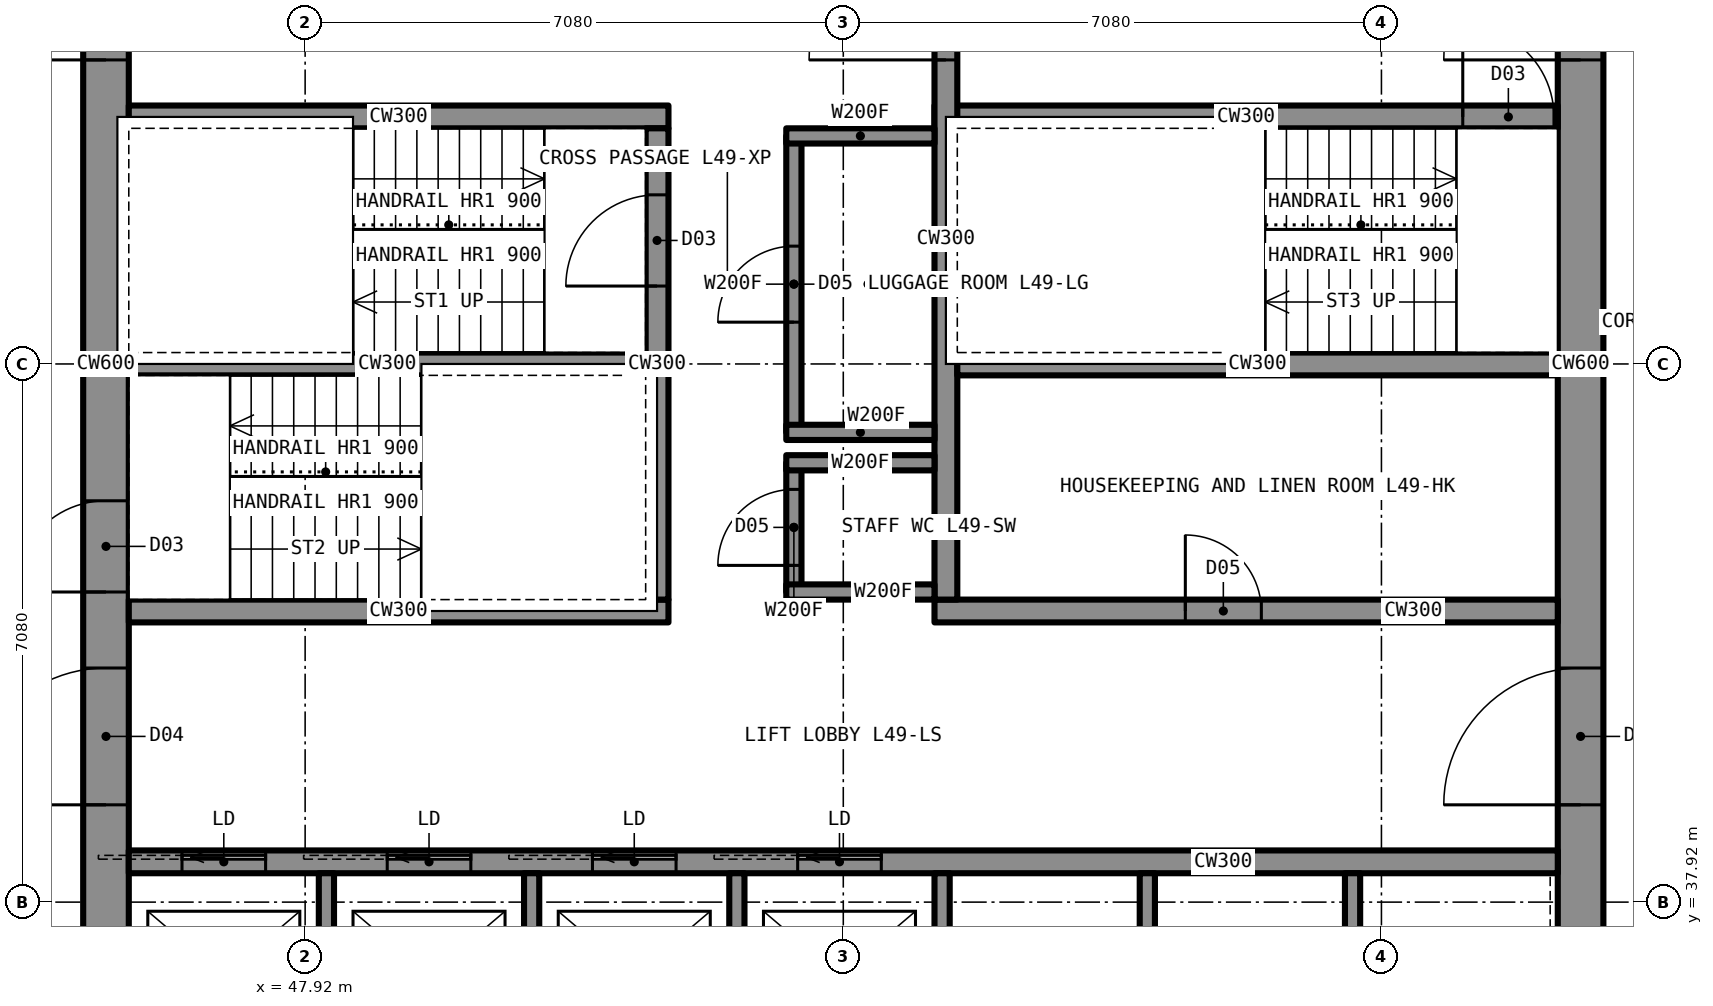
"""IFC4 building model, lengths in metres.
Left out: names, types, materials, properties, quantities, classifications, styles, units other than length and angle.
Written with IfcOpenShell. Run it as: python <this file> out.ifc"""

import sys

from ifc_helpers import new_model, si_unit, direction, frame, frame_2d, origin, place, context, subcontext, project, spatial, rectangle, extrude, element, fill, save


model = new_model("IFC4")
c1 = context("Model", 3, precision=1e-05, world=origin(), true_north=direction((0.0, 1.0)))
c2 = subcontext(c1, "Body", "Model", "MODEL_VIEW")
j1 = project(units=[si_unit("LENGTHUNIT", "METRE"), si_unit("PLANEANGLEUNIT", "RADIAN")], contexts=[c1])
p1 = place(None, origin())
s1 = spatial("IfcSite", under=j1, at=p1, CompositionType="ELEMENT")
p2 = place(p1, origin())
s2 = spatial("IfcBuilding", under=s1, at=p2, CompositionType="ELEMENT")
p3 = place(p2, frame((0.0, 0.0, 182.8)))
s3 = spatial("IfcBuildingStorey", under=s2, at=p3, CompositionType="ELEMENT", Elevation=182.8)
p4 = place(p3, frame((64.7, 35.6, 0.0), z_axis=(0.0, 0.0, 1.0), x_axis=(0.0, 1.0, 0.0)))
e1 = element("IfcWall", 1, at=p4, inside=s3, PredefinedType="SHEAR", context=c2, shape_type="SweptSolid", body=[
    extrude(rectangle(XDim=18.8, YDim=0.6, at=frame_2d((9.4, 0.0))), origin(), (0.0, 0.0, 1.0), 3.5),
])
p5 = place(p4, frame((13.4, 0.0, 0.0)))
e2 = element("IfcOpeningElement", 2, at=p5, cuts=e1, PredefinedType="OPENING", context=c2, shape_type="SweptSolid", body=[
    extrude(rectangle(XDim=1.8, YDim=2.2, at=frame_2d((0.9, 1.1))), frame((0.0, 0.31, 0.0), z_axis=(0.0, -1.0, 0.0), x_axis=(1.0, 0.0, 0.0)), (0.0, 0.0, 1.0), 0.62),
])
p6 = place(p4, frame((3.6, 0.0, 0.0)))
e3 = element("IfcOpeningElement", 3, at=p6, cuts=e1, PredefinedType="OPENING", context=c2, shape_type="SweptSolid", body=[
    extrude(rectangle(XDim=1.8, YDim=2.2, at=frame_2d((0.9, 1.1))), frame((0.0, 0.31, 0.0), z_axis=(0.0, -1.0, 0.0), x_axis=(1.0, 0.0, 0.0)), (0.0, 0.0, 1.0), 0.62),
])
p7 = place(p3, frame((45.3, 35.6, 0.0), z_axis=(0.0, 0.0, 1.0), x_axis=(0.0, 1.0, 0.0)))
e4 = element("IfcWall", 4, at=p7, inside=s3, PredefinedType="SHEAR", context=c2, shape_type="SweptSolid", body=[
    extrude(rectangle(XDim=18.8, YDim=0.6, at=frame_2d((9.4, 0.0))), origin(), (0.0, 0.0, 1.0), 3.5),
])
p8 = place(p7, frame((13.4, 0.0, 0.0)))
e5 = element("IfcOpeningElement", 5, at=p8, cuts=e4, PredefinedType="OPENING", context=c2, shape_type="SweptSolid", body=[
    extrude(rectangle(XDim=1.8, YDim=2.2, at=frame_2d((0.9, 1.1))), frame((0.0, 0.31, 0.0), z_axis=(0.0, -1.0, 0.0), x_axis=(1.0, 0.0, 0.0)), (0.0, 0.0, 1.0), 0.62),
])
p9 = place(p7, frame((3.6, 0.0, 0.0)))
e6 = element("IfcOpeningElement", 6, at=p9, cuts=e4, PredefinedType="OPENING", context=c2, shape_type="SweptSolid", body=[
    extrude(rectangle(XDim=1.8, YDim=2.2, at=frame_2d((0.9, 1.1))), frame((0.0, 0.31, 0.0), z_axis=(0.0, -1.0, 0.0), x_axis=(1.0, 0.0, 0.0)), (0.0, 0.0, 1.0), 0.62),
])
p10 = place(p7, frame((6.4, 0.0, 0.0)))
e7 = element("IfcOpeningElement", 7, at=p10, cuts=e4, PredefinedType="OPENING", context=c2, shape_type="SweptSolid", body=[
    extrude(rectangle(XDim=1.2, YDim=2.2, at=frame_2d((0.6, 1.1))), frame((0.0, 0.31, 0.0), z_axis=(0.0, -1.0, 0.0), x_axis=(1.0, 0.0, 0.0)), (0.0, 0.0, 1.0), 0.62),
])
p11 = place(p3, frame((45.6, 38.45, 0.0), z_axis=(0.0, 0.0, 1.0), x_axis=(1.0, 0.0, 0.0)))
e8 = element("IfcWall", 8, at=p11, inside=s3, PredefinedType="SHEAR", context=c2, shape_type="SweptSolid", body=[
    extrude(rectangle(XDim=18.8, YDim=0.3, at=frame_2d((9.4, 0.0))), origin(), (0.0, 0.0, 1.0), 3.5),
])
p12 = place(p11, frame((0.7, 0.0, 0.0)))
e9 = element("IfcOpeningElement", 9, at=p12, cuts=e8, PredefinedType="OPENING", context=c2, shape_type="SweptSolid", body=[
    extrude(rectangle(XDim=1.1, YDim=2.2, at=frame_2d((0.55, 1.1))), frame((0.0, 0.16, 0.0), z_axis=(0.0, -1.0, 0.0), x_axis=(1.0, 0.0, 0.0)), (0.0, 0.0, 1.0), 0.32),
])
p13 = place(p11, frame((3.4, 0.0, 0.0)))
e10 = element("IfcOpeningElement", 10, at=p13, cuts=e8, PredefinedType="OPENING", context=c2, shape_type="SweptSolid", body=[
    extrude(rectangle(XDim=1.1, YDim=2.2, at=frame_2d((0.55, 1.1))), frame((0.0, 0.16, 0.0), z_axis=(0.0, -1.0, 0.0), x_axis=(1.0, 0.0, 0.0)), (0.0, 0.0, 1.0), 0.32),
])
p14 = place(p11, frame((6.1, 0.0, 0.0)))
e11 = element("IfcOpeningElement", 11, at=p14, cuts=e8, PredefinedType="OPENING", context=c2, shape_type="SweptSolid", body=[
    extrude(rectangle(XDim=1.1, YDim=2.2, at=frame_2d((0.55, 1.1))), frame((0.0, 0.16, 0.0), z_axis=(0.0, -1.0, 0.0), x_axis=(1.0, 0.0, 0.0)), (0.0, 0.0, 1.0), 0.32),
])
p15 = place(p11, frame((8.8, 0.0, 0.0)))
e12 = element("IfcOpeningElement", 12, at=p15, cuts=e8, PredefinedType="OPENING", context=c2, shape_type="SweptSolid", body=[
    extrude(rectangle(XDim=1.1, YDim=2.2, at=frame_2d((0.55, 1.1))), frame((0.0, 0.16, 0.0), z_axis=(0.0, -1.0, 0.0), x_axis=(1.0, 0.0, 0.0)), (0.0, 0.0, 1.0), 0.32),
])
p16 = place(p3, frame((45.6, 48.25, 0.0), z_axis=(0.0, 0.0, 1.0), x_axis=(1.0, 0.0, 0.0)))
e13 = element("IfcWall", 13, at=p16, inside=s3, PredefinedType="SHEAR", context=c2, shape_type="SweptSolid", body=[
    extrude(rectangle(XDim=7.1, YDim=0.3, at=frame_2d((3.55, 0.0))), origin(), (0.0, 0.0, 1.0), 3.5),
])
p17 = place(p3, frame((56.2, 48.25, 0.0), z_axis=(0.0, 0.0, 1.0), x_axis=(1.0, 0.0, 0.0)))
e14 = element("IfcWall", 14, at=p17, inside=s3, PredefinedType="SHEAR", context=c2, shape_type="SweptSolid", body=[
    extrude(rectangle(XDim=8.2, YDim=0.3, at=frame_2d((4.1, 0.0))), origin(), (0.0, 0.0, 1.0), 3.5),
])
p18 = place(p17, frame((6.95, 0.0, 0.0)))
e15 = element("IfcOpeningElement", 15, at=p18, cuts=e14, PredefinedType="OPENING", context=c2, shape_type="SweptSolid", body=[
    extrude(rectangle(XDim=1.2, YDim=2.2, at=frame_2d((0.6, 1.1))), frame((0.0, 0.16, 0.0), z_axis=(0.0, -1.0, 0.0), x_axis=(1.0, 0.0, 0.0)), (0.0, 0.0, 1.0), 0.32),
])
p19 = place(p3, frame((45.6, 41.75, 0.0), z_axis=(0.0, 0.0, 1.0), x_axis=(1.0, 0.0, 0.0)))
e16 = element("IfcWall", 16, at=p19, inside=s3, PredefinedType="SHEAR", context=c2, shape_type="SweptSolid", body=[
    extrude(rectangle(XDim=7.1, YDim=0.3, at=frame_2d((3.55, 0.0))), origin(), (0.0, 0.0, 1.0), 3.5),
])
p20 = place(p3, frame((56.2, 41.75, 0.0), z_axis=(0.0, 0.0, 1.0), x_axis=(1.0, 0.0, 0.0)))
e17 = element("IfcWall", 17, at=p20, inside=s3, PredefinedType="SHEAR", context=c2, shape_type="SweptSolid", body=[
    extrude(rectangle(XDim=8.2, YDim=0.3, at=frame_2d((4.1, 0.0))), origin(), (0.0, 0.0, 1.0), 3.5),
])
p21 = place(p20, frame((3.3, 0.0, 0.0)))
e18 = element("IfcOpeningElement", 18, at=p21, cuts=e17, PredefinedType="OPENING", context=c2, shape_type="SweptSolid", body=[
    extrude(rectangle(XDim=1.0, YDim=2.1, at=frame_2d((0.5, 1.05))), frame((0.0, 0.16, 0.0), z_axis=(0.0, -1.0, 0.0), x_axis=(1.0, 0.0, 0.0)), (0.0, 0.0, 1.0), 0.32),
])
p22 = place(p3, frame((52.55, 41.9, 0.0), z_axis=(0.0, 0.0, 1.0), x_axis=(0.0, 1.0, 0.0)))
e19 = element("IfcWall", 19, at=p22, inside=s3, PredefinedType="SHEAR", context=c2, shape_type="SweptSolid", body=[
    extrude(rectangle(XDim=6.2, YDim=0.3, at=frame_2d((3.1, 0.0))), origin(), (0.0, 0.0, 1.0), 3.5),
])
p23 = place(p22, frame((4.125, 0.0, 0.0)))
e20 = element("IfcOpeningElement", 20, at=p23, cuts=e19, PredefinedType="OPENING", context=c2, shape_type="SweptSolid", body=[
    extrude(rectangle(XDim=1.2, YDim=2.2, at=frame_2d((0.6, 1.1))), frame((0.0, 0.16, 0.0), z_axis=(0.0, -1.0, 0.0), x_axis=(1.0, 0.0, 0.0)), (0.0, 0.0, 1.0), 0.32),
])
p24 = place(p3, frame((56.35, 41.9, 0.0), z_axis=(0.0, 0.0, 1.0), x_axis=(0.0, 1.0, 0.0)))
e21 = element("IfcWall", 21, at=p24, inside=s3, PredefinedType="SHEAR", context=c2, shape_type="SweptSolid", body=[
    extrude(rectangle(XDim=9.5, YDim=0.3, at=frame_2d((4.75, 0.0))), origin(), (0.0, 0.0, 1.0), 3.5),
])
p25 = place(p24, frame((7.1, 0.0, 0.0)))
e22 = element("IfcOpeningElement", 22, at=p25, cuts=e21, PredefinedType="OPENING", context=c2, shape_type="SweptSolid", body=[
    extrude(rectangle(XDim=1.8, YDim=2.2, at=frame_2d((0.9, 1.1))), frame((0.0, 0.16, 0.0), z_axis=(0.0, -1.0, 0.0), x_axis=(1.0, 0.0, 0.0)), (0.0, 0.0, 1.0), 0.32),
])
p26 = place(p3, frame((45.6, 45.0, 0.0), z_axis=(0.0, 0.0, 1.0), x_axis=(1.0, 0.0, 0.0)))
e23 = element("IfcWall", 23, at=p26, inside=s3, PredefinedType="SHEAR", context=c2, shape_type="SweptSolid", body=[
    extrude(rectangle(XDim=6.8, YDim=0.3, at=frame_2d((3.4, 0.0))), origin(), (0.0, 0.0, 1.0), 3.5),
])
p27 = place(p3, frame((56.5, 45.0, 0.0), z_axis=(0.0, 0.0, 1.0), x_axis=(1.0, 0.0, 0.0)))
e24 = element("IfcWall", 24, at=p27, inside=s3, PredefinedType="SHEAR", context=c2, shape_type="SweptSolid", body=[
    extrude(rectangle(XDim=7.9, YDim=0.3, at=frame_2d((3.95, 0.0))), origin(), (0.0, 0.0, 1.0), 3.5),
])
p28 = place(p3, frame((54.35, 42.0, 0.0), z_axis=(0.0, 0.0, 1.0), x_axis=(0.0, 1.0, 0.0)))
e25 = element("IfcWall", 25, at=p28, inside=s3, PredefinedType="PARTITIONING", context=c2, shape_type="SweptSolid", body=[
    extrude(rectangle(XDim=1.7, YDim=0.2, at=frame_2d((0.85, 0.0))), origin(), (0.0, 0.0, 1.0), 3.33),
])
p29 = place(p28, frame((0.35, 0.0, 0.0)))
e26 = element("IfcOpeningElement", 26, at=p29, cuts=e25, PredefinedType="OPENING", context=c2, shape_type="SweptSolid", body=[
    extrude(rectangle(XDim=1.0, YDim=2.1, at=frame_2d((0.5, 1.05))), frame((0.0, 0.11, 0.0), z_axis=(0.0, -1.0, 0.0), x_axis=(1.0, 0.0, 0.0)), (0.0, 0.0, 1.0), 0.22),
])
for number, where, z_axis, x_axis in (
    (27, (54.25, 42.0, 0.0), (0.0, 0.0, 1.0), (1.0, 0.0, 0.0)),
    (28, (54.25, 43.7, 0.0), (0.0, 0.0, 1.0), (1.0, 0.0, 0.0)),
):
    element("IfcWall", number, at=place(p3, frame(where, z_axis=z_axis, x_axis=x_axis)), inside=s3, PredefinedType="PARTITIONING", context=c2, shape_type="SweptSolid", body=[
        extrude(rectangle(XDim=1.95, YDim=0.2, at=frame_2d((0.975, 0.0))), origin(), (0.0, 0.0, 1.0), 3.33),
    ])
p30 = place(p3, frame((54.35, 44.1, 0.0), z_axis=(0.0, 0.0, 1.0), x_axis=(0.0, 1.0, 0.0)))
e29 = element("IfcWall", 29, at=p30, inside=s3, PredefinedType="PARTITIONING", context=c2, shape_type="SweptSolid", body=[
    extrude(rectangle(XDim=3.9, YDim=0.2, at=frame_2d((1.95, 0.0))), origin(), (0.0, 0.0, 1.0), 3.33),
])
p31 = place(p30, frame((1.45, 0.0, 0.0)))
e30 = element("IfcOpeningElement", 30, at=p31, cuts=e29, PredefinedType="OPENING", context=c2, shape_type="SweptSolid", body=[
    extrude(rectangle(XDim=1.0, YDim=2.1, at=frame_2d((0.5, 1.05))), frame((0.0, 0.11, 0.0), z_axis=(0.0, -1.0, 0.0), x_axis=(1.0, 0.0, 0.0)), (0.0, 0.0, 1.0), 0.22),
])
for number, where, z_axis, x_axis in (
    (31, (54.25, 44.1, 0.0), (0.0, 0.0, 1.0), (1.0, 0.0, 0.0)),
    (32, (54.25, 48.0, 0.0), (0.0, 0.0, 1.0), (1.0, 0.0, 0.0)),
):
    element("IfcWall", number, at=place(p3, frame(where, z_axis=z_axis, x_axis=x_axis)), inside=s3, PredefinedType="PARTITIONING", context=c2, shape_type="SweptSolid", body=[
        extrude(rectangle(XDim=1.95, YDim=0.2, at=frame_2d((0.975, 0.0))), origin(), (0.0, 0.0, 1.0), 3.33),
    ])
for number, where, z_axis, x_axis in (
    (33, (48.2, 35.6, 0.0), (0.0, 0.0, 1.0), (0.0, 1.0, 0.0)),
    (34, (50.9, 35.6, 0.0), (0.0, 0.0, 1.0), (0.0, 1.0, 0.0)),
    (35, (53.6, 35.6, 0.0), (0.0, 0.0, 1.0), (0.0, 1.0, 0.0)),
    (36, (56.3, 35.6, 0.0), (0.0, 0.0, 1.0), (0.0, 1.0, 0.0)),
    (37, (59.0, 35.6, 0.0), (0.0, 0.0, 1.0), (0.0, 1.0, 0.0)),
    (38, (61.7, 35.6, 0.0), (0.0, 0.0, 1.0), (0.0, 1.0, 0.0)),
):
    element("IfcWall", number, at=place(p3, frame(where, z_axis=z_axis, x_axis=x_axis)), inside=s3, PredefinedType="PARTITIONING", context=c2, shape_type="SweptSolid", body=[
        extrude(rectangle(XDim=2.7, YDim=0.2, at=frame_2d((1.35, 0.0))), origin(), (0.0, 0.0, 1.0), 3.33),
    ])
p32 = place(p29, origin())
e39 = element("IfcDoor", 39, at=p32, inside=s3, OperationType="SINGLE_SWING_LEFT", PredefinedType="DOOR", context=c2, shape_type="SweptSolid", body=[
    extrude(rectangle(XDim=1.0, YDim=2.1, at=frame_2d((0.5, 1.05))), frame((0.0, 0.025, 0.0), z_axis=(0.0, -1.0, 0.0), x_axis=(1.0, 0.0, 0.0)), (0.0, 0.0, 1.0), 0.05),
])
fill(e26, e39)
p33 = place(p31, origin())
e40 = element("IfcDoor", 40, at=p33, inside=s3, OperationType="SINGLE_SWING_LEFT", PredefinedType="DOOR", context=c2, shape_type="SweptSolid", body=[
    extrude(rectangle(XDim=1.0, YDim=2.1, at=frame_2d((0.5, 1.05))), frame((0.0, 0.025, 0.0), z_axis=(0.0, -1.0, 0.0), x_axis=(1.0, 0.0, 0.0)), (0.0, 0.0, 1.0), 0.05),
])
fill(e30, e40)
p34 = place(p8, origin())
e41 = element("IfcDoor", 41, at=p34, inside=s3, OperationType="DOUBLE_DOOR_SINGLE_SWING", PredefinedType="DOOR", context=c2, shape_type="SweptSolid", body=[
    extrude(rectangle(XDim=1.8, YDim=2.2, at=frame_2d((0.9, 1.1))), frame((0.0, 0.025, 0.0), z_axis=(0.0, -1.0, 0.0), x_axis=(1.0, 0.0, 0.0)), (0.0, 0.0, 1.0), 0.05),
])
fill(e5, e41)
p35 = place(p9, origin())
e42 = element("IfcDoor", 42, at=p35, inside=s3, OperationType="DOUBLE_DOOR_SINGLE_SWING", PredefinedType="DOOR", context=c2, shape_type="SweptSolid", body=[
    extrude(rectangle(XDim=1.8, YDim=2.2, at=frame_2d((0.9, 1.1))), frame((0.0, 0.025, 0.0), z_axis=(0.0, -1.0, 0.0), x_axis=(1.0, 0.0, 0.0)), (0.0, 0.0, 1.0), 0.05),
])
fill(e6, e42)
p36 = place(p5, origin())
e43 = element("IfcDoor", 43, at=p36, inside=s3, OperationType="DOUBLE_DOOR_SINGLE_SWING", PredefinedType="DOOR", context=c2, shape_type="SweptSolid", body=[
    extrude(rectangle(XDim=1.8, YDim=2.2, at=frame_2d((0.9, 1.1))), frame((0.0, 0.025, 0.0), z_axis=(0.0, -1.0, 0.0), x_axis=(1.0, 0.0, 0.0)), (0.0, 0.0, 1.0), 0.05),
])
fill(e2, e43)
p37 = place(p6, origin())
e44 = element("IfcDoor", 44, at=p37, inside=s3, OperationType="DOUBLE_DOOR_SINGLE_SWING", PredefinedType="DOOR", context=c2, shape_type="SweptSolid", body=[
    extrude(rectangle(XDim=1.8, YDim=2.2, at=frame_2d((0.9, 1.1))), frame((0.0, 0.025, 0.0), z_axis=(0.0, -1.0, 0.0), x_axis=(1.0, 0.0, 0.0)), (0.0, 0.0, 1.0), 0.05),
])
fill(e3, e44)
p38 = place(p25, origin())
e45 = element("IfcDoor", 45, at=p38, inside=s3, OperationType="DOUBLE_DOOR_SINGLE_SWING", PredefinedType="DOOR", context=c2, shape_type="SweptSolid", body=[
    extrude(rectangle(XDim=1.8, YDim=2.2, at=frame_2d((0.9, 1.1))), frame((0.0, 0.025, 0.0), z_axis=(0.0, -1.0, 0.0), x_axis=(1.0, 0.0, 0.0)), (0.0, 0.0, 1.0), 0.05),
])
fill(e22, e45)
p39 = place(p23, origin())
e46 = element("IfcDoor", 46, at=p39, inside=s3, OperationType="SINGLE_SWING_LEFT", PredefinedType="DOOR", context=c2, shape_type="SweptSolid", body=[
    extrude(rectangle(XDim=1.2, YDim=2.2, at=frame_2d((0.6, 1.1))), frame((0.0, 0.025, 0.0), z_axis=(0.0, -1.0, 0.0), x_axis=(1.0, 0.0, 0.0)), (0.0, 0.0, 1.0), 0.05),
])
fill(e20, e46)
p40 = place(p10, origin())
e47 = element("IfcDoor", 47, at=p40, inside=s3, OperationType="SINGLE_SWING_LEFT", PredefinedType="DOOR", context=c2, shape_type="SweptSolid", body=[
    extrude(rectangle(XDim=1.2, YDim=2.2, at=frame_2d((0.6, 1.1))), frame((0.0, 0.025, 0.0), z_axis=(0.0, -1.0, 0.0), x_axis=(1.0, 0.0, 0.0)), (0.0, 0.0, 1.0), 0.05),
])
fill(e7, e47)
p41 = place(p18, origin())
e48 = element("IfcDoor", 48, at=p41, inside=s3, OperationType="SINGLE_SWING_LEFT", PredefinedType="DOOR", context=c2, shape_type="SweptSolid", body=[
    extrude(rectangle(XDim=1.2, YDim=2.2, at=frame_2d((0.6, 1.1))), frame((0.0, 0.025, 0.0), z_axis=(0.0, -1.0, 0.0), x_axis=(1.0, 0.0, 0.0)), (0.0, 0.0, 1.0), 0.05),
])
fill(e15, e48)
p42 = place(p21, origin())
e49 = element("IfcDoor", 49, at=p42, inside=s3, OperationType="SINGLE_SWING_LEFT", PredefinedType="DOOR", context=c2, shape_type="SweptSolid", body=[
    extrude(rectangle(XDim=1.0, YDim=2.1, at=frame_2d((0.5, 1.05))), frame((0.0, 0.025, 0.0), z_axis=(0.0, -1.0, 0.0), x_axis=(1.0, 0.0, 0.0)), (0.0, 0.0, 1.0), 0.05),
])
fill(e18, e49)
p43 = place(p12, origin())
e50 = element("IfcDoor", 50, at=p43, inside=s3, OperationType="SLIDING_TO_LEFT", PredefinedType="DOOR", context=c2, shape_type="SweptSolid", body=[
    extrude(rectangle(XDim=1.1, YDim=2.2, at=frame_2d((0.55, 1.1))), frame((0.0, 0.025, 0.0), z_axis=(0.0, -1.0, 0.0), x_axis=(1.0, 0.0, 0.0)), (0.0, 0.0, 1.0), 0.05),
])
fill(e9, e50)
p44 = place(p13, origin())
e51 = element("IfcDoor", 51, at=p44, inside=s3, OperationType="SLIDING_TO_LEFT", PredefinedType="DOOR", context=c2, shape_type="SweptSolid", body=[
    extrude(rectangle(XDim=1.1, YDim=2.2, at=frame_2d((0.55, 1.1))), frame((0.0, 0.025, 0.0), z_axis=(0.0, -1.0, 0.0), x_axis=(1.0, 0.0, 0.0)), (0.0, 0.0, 1.0), 0.05),
])
fill(e10, e51)
p45 = place(p14, origin())
e52 = element("IfcDoor", 52, at=p45, inside=s3, OperationType="SLIDING_TO_LEFT", PredefinedType="DOOR", context=c2, shape_type="SweptSolid", body=[
    extrude(rectangle(XDim=1.1, YDim=2.2, at=frame_2d((0.55, 1.1))), frame((0.0, 0.025, 0.0), z_axis=(0.0, -1.0, 0.0), x_axis=(1.0, 0.0, 0.0)), (0.0, 0.0, 1.0), 0.05),
])
fill(e11, e52)
p46 = place(p15, origin())
e53 = element("IfcDoor", 53, at=p46, inside=s3, OperationType="SLIDING_TO_LEFT", PredefinedType="DOOR", context=c2, shape_type="SweptSolid", body=[
    extrude(rectangle(XDim=1.1, YDim=2.2, at=frame_2d((0.55, 1.1))), frame((0.0, 0.025, 0.0), z_axis=(0.0, -1.0, 0.0), x_axis=(1.0, 0.0, 0.0)), (0.0, 0.0, 1.0), 0.05),
])
fill(e12, e53)
save(model, sys.argv[1])
